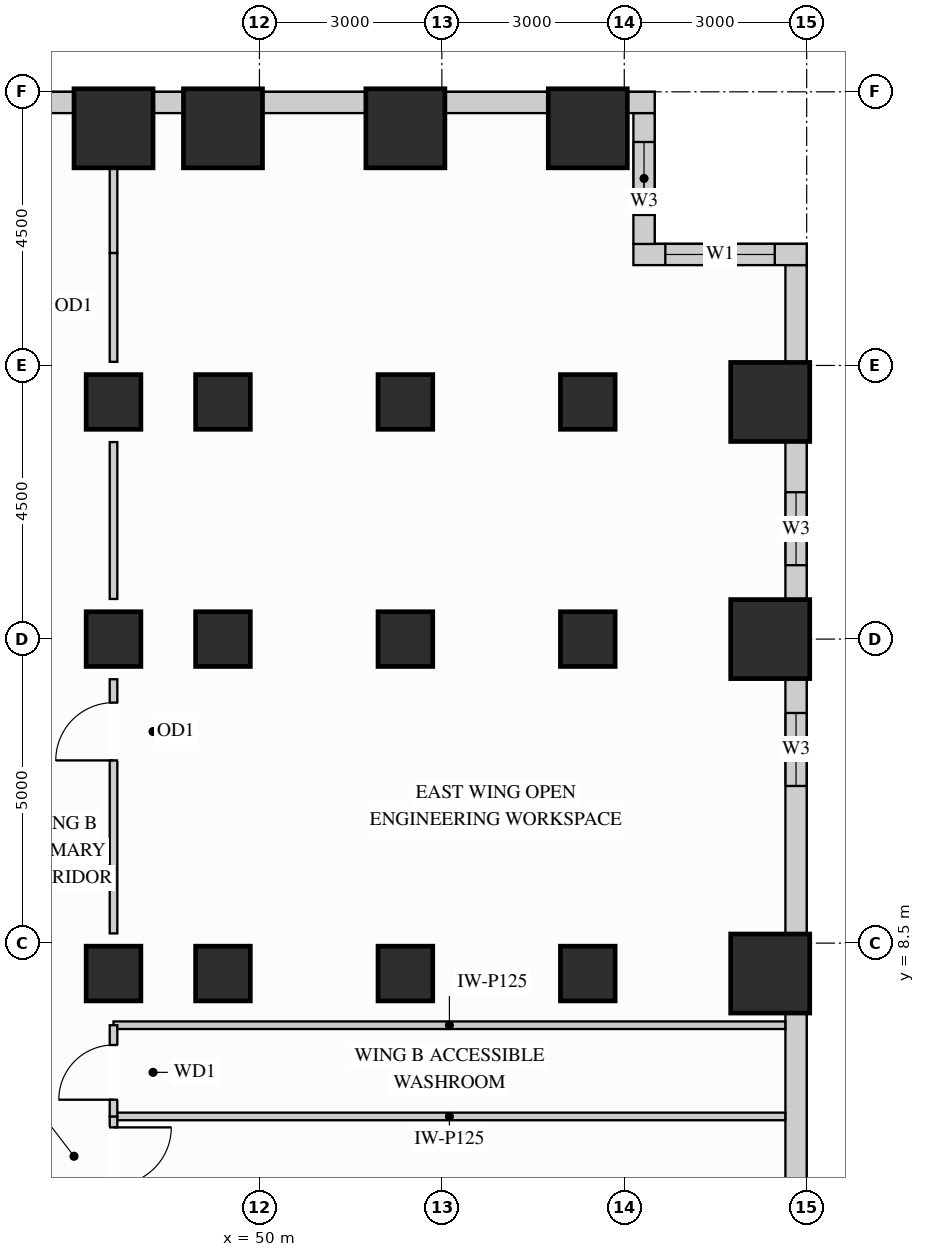
"""IFC4 building model, lengths in metres.
Left out: names, types, materials, properties, quantities, classifications, styles, units other than length and angle.
Written with IfcOpenShell. Run it as: python <this file> out.ifc"""

import sys

from ifc_helpers import new_model, si_unit, direction, frame, frame_2d, origin, origin_2d, place, context, subcontext, project, spatial, rectangle, extrude, source, transform, mapped, element, fill, save


model = new_model("IFC4")
c1 = context("Model", 3, precision=1e-05, world=origin(), true_north=direction((0.0, 1.0)))
c2 = subcontext(c1, "Body", "Model", "MODEL_VIEW")
j1 = project(units=[si_unit("LENGTHUNIT", "METRE"), si_unit("PLANEANGLEUNIT", "RADIAN")], contexts=[c1])
p1 = place(None, origin())
s1 = spatial("IfcSite", under=j1, at=p1, CompositionType="ELEMENT")
p2 = place(p1, origin())
s2 = spatial("IfcBuilding", under=s1, at=p2, CompositionType="ELEMENT")
p3 = place(p2, frame((0.0, 0.0, 36.9)))
s3 = spatial("IfcBuildingStorey", under=s2, at=p3, CompositionType="ELEMENT", Elevation=36.9)
m1 = source(origin(), c2, "Body", "SweptSolid", [
    extrude(rectangle(XDim=0.9, YDim=0.9, at=origin_2d()), origin(), (0.0, 0.0, 1.0), 3.38),
])
for number, where, z_axis, x_axis in (
    (1, (47.6, 13.5, 0.0), (0.0, 0.0, 1.0), (1.0, 0.0, 0.0)),
    (2, (47.6, 8.0, 0.0), (0.0, 0.0, 1.0), (1.0, 0.0, 0.0)),
    (3, (47.6, 17.4, 0.0), (0.0, 0.0, 1.0), (1.0, 0.0, 0.0)),
    (4, (49.4, 13.5, 0.0), (0.0, 0.0, 1.0), (1.0, 0.0, 0.0)),
    (5, (49.4, 17.4, 0.0), (0.0, 0.0, 1.0), (1.0, 0.0, 0.0)),
    (6, (49.4, 8.0, 0.0), (0.0, 0.0, 1.0), (1.0, 0.0, 0.0)),
    (7, (52.4, 13.5, 0.0), (0.0, 0.0, 1.0), (1.0, 0.0, 0.0)),
    (8, (52.4, 17.4, 0.0), (0.0, 0.0, 1.0), (1.0, 0.0, 0.0)),
    (9, (52.4, 8.0, 0.0), (0.0, 0.0, 1.0), (1.0, 0.0, 0.0)),
    (10, (55.4, 13.5, 0.0), (0.0, 0.0, 1.0), (1.0, 0.0, 0.0)),
    (11, (55.4, 17.4, 0.0), (0.0, 0.0, 1.0), (1.0, 0.0, 0.0)),
    (12, (55.4, 8.0, 0.0), (0.0, 0.0, 1.0), (1.0, 0.0, 0.0)),
):
    element("IfcColumn", number, at=place(p3, frame(where, z_axis=z_axis, x_axis=x_axis)), inside=s3, PredefinedType="COLUMN", context=c2, shape_type="MappedRepresentation", body=[
        mapped(m1, transform((0.0, 0.0, 0.0), x_axis=(1.0, 0.0, 0.0), y_axis=(0.0, 1.0, 0.0), z_axis=(0.0, 0.0, 1.0))),
    ])
m2 = source(origin(), c2, "Body", "SweptSolid", [
    extrude(rectangle(XDim=1.3, YDim=1.3, at=origin_2d()), origin(), (0.0, 0.0, 1.0), 3.38),
])
for number, where, z_axis, x_axis in (
    (13, (47.6, 21.9, 0.0), (0.0, 0.0, 1.0), (1.0, 0.0, 0.0)),
    (14, (49.4, 21.9, 0.0), (0.0, 0.0, 1.0), (1.0, 0.0, 0.0)),
    (15, (52.4, 21.9, 0.0), (0.0, 0.0, 1.0), (1.0, 0.0, 0.0)),
    (16, (55.4, 21.9, 0.0), (0.0, 0.0, 1.0), (1.0, 0.0, 0.0)),
    (17, (58.4, 13.5, 0.0), (0.0, 0.0, 1.0), (1.0, 0.0, 0.0)),
    (18, (58.4, 17.4, 0.0), (0.0, 0.0, 1.0), (1.0, 0.0, 0.0)),
    (19, (58.4, 8.0, 0.0), (0.0, 0.0, 1.0), (1.0, 0.0, 0.0)),
):
    element("IfcColumn", number, at=place(p3, frame(where, z_axis=z_axis, x_axis=x_axis)), inside=s3, PredefinedType="COLUMN", context=c2, shape_type="MappedRepresentation", body=[
        mapped(m2, transform((0.0, 0.0, 0.0), x_axis=(1.0, 0.0, 0.0), y_axis=(0.0, 1.0, 0.0), z_axis=(0.0, 0.0, 1.0))),
    ])
m3 = source(origin(), c2, "Body", "SweptSolid", [
    extrude(rectangle(XDim=3.204, YDim=0.35, at=frame_2d((1.602, 0.0))), origin(), (0.0, 0.0, 1.0), 2.51),
])
p4 = place(p3, frame((58.825, 4.148, 0.0), z_axis=(0.0, 0.0, 1.0), x_axis=(0.0, 1.0, 0.0)))
e20 = element("IfcWall", 20, at=p4, inside=s3, PredefinedType="SOLIDWALL", context=c2, shape_type="MappedRepresentation", body=[
    mapped(m3, transform((0.0, 0.0, 0.0), x_axis=(1.0, 0.0, 0.0), y_axis=(0.0, 1.0, 0.0), z_axis=(0.0, 0.0, 1.0))),
])
p5 = place(p3, frame((58.825, 8.648, 0.0), z_axis=(0.0, 0.0, 1.0), x_axis=(0.0, 1.0, 0.0)))
e21 = element("IfcWall", 21, at=p5, inside=s3, PredefinedType="SOLIDWALL", context=c2, shape_type="SweptSolid", body=[
    extrude(rectangle(XDim=4.204, YDim=0.35, at=frame_2d((2.102, 0.0))), origin(), (0.0, 0.0, 1.0), 2.51),
])
p6 = place(p5, frame((2.437, 0.0, 0.78)))
e22 = element("IfcOpeningElement", 22, at=p6, cuts=e21, PredefinedType="OPENING", context=c2, shape_type="SweptSolid", body=[
    extrude(rectangle(XDim=1.2, YDim=1.55, at=frame_2d((0.6, 0.775))), frame((0.0, 0.185, 0.0), z_axis=(0.0, -1.0, 0.0), x_axis=(1.0, 0.0, 0.0)), (0.0, 0.0, 1.0), 0.37),
])
p7 = place(p3, frame((58.825, 14.148, 0.0), z_axis=(0.0, 0.0, 1.0), x_axis=(0.0, 1.0, 0.0)))
e23 = element("IfcWall", 23, at=p7, inside=s3, PredefinedType="SOLIDWALL", context=c2, shape_type="SweptSolid", body=[
    extrude(rectangle(XDim=2.604, YDim=0.35, at=frame_2d((1.302, 0.0))), origin(), (0.0, 0.0, 1.0), 2.51),
])
p8 = place(p7, frame((0.567, 0.0, 0.78)))
e24 = element("IfcOpeningElement", 24, at=p8, cuts=e23, PredefinedType="OPENING", context=c2, shape_type="SweptSolid", body=[
    extrude(rectangle(XDim=1.2, YDim=1.55, at=frame_2d((0.6, 0.775))), frame((0.0, 0.185, 0.0), z_axis=(0.0, -1.0, 0.0), x_axis=(1.0, 0.0, 0.0)), (0.0, 0.0, 1.0), 0.37),
])
m4 = source(origin(), c2, "Body", "SweptSolid", [
    extrude(rectangle(XDim=1.604, YDim=0.35, at=frame_2d((0.802, 0.0))), origin(), (0.0, 0.0, 1.0), 3.365),
])
p9 = place(p3, frame((58.825, 18.048, 0.0), z_axis=(0.0, 0.0, 1.0), x_axis=(0.0, 1.0, 0.0)))
e25 = element("IfcWall", 25, at=p9, inside=s3, PredefinedType="SOLIDWALL", context=c2, shape_type="MappedRepresentation", body=[
    mapped(m4, transform((0.0, 0.0, 0.0), x_axis=(1.0, 0.0, 0.0), y_axis=(0.0, 1.0, 0.0), z_axis=(0.0, 0.0, 1.0))),
])
p10 = place(p3, frame((59.0, 19.825, 0.0), z_axis=(0.0, 0.0, 1.0), x_axis=(-1.0, 0.0, 0.0)))
e26 = element("IfcWall", 26, at=p10, inside=s3, PredefinedType="SOLIDWALL", context=c2, shape_type="SweptSolid", body=[
    extrude(rectangle(XDim=2.85, YDim=0.35, at=frame_2d((1.425, 0.0))), origin(), (0.0, 0.0, 1.0), 3.365),
])
p11 = place(p10, frame((0.525, 0.0, 0.78)))
e27 = element("IfcOpeningElement", 27, at=p11, cuts=e26, PredefinedType="OPENING", context=c2, shape_type="SweptSolid", body=[
    extrude(rectangle(XDim=1.8, YDim=2.1, at=frame_2d((0.9, 1.05))), frame((0.0, 0.185, 0.0), z_axis=(0.0, -1.0, 0.0), x_axis=(1.0, 0.0, 0.0)), (0.0, 0.0, 1.0), 0.37),
])
p12 = place(p3, frame((56.325, 19.998, 0.0), z_axis=(0.0, 0.0, 1.0), x_axis=(0.0, 1.0, 0.0)))
e28 = element("IfcWall", 28, at=p12, inside=s3, PredefinedType="SOLIDWALL", context=c2, shape_type="SweptSolid", body=[
    extrude(rectangle(XDim=2.154, YDim=0.35, at=frame_2d((1.077, 0.0))), origin(), (0.0, 0.0, 1.0), 3.365),
])
p13 = place(p12, frame((0.477, 0.0, 0.78)))
e29 = element("IfcOpeningElement", 29, at=p13, cuts=e28, PredefinedType="OPENING", context=c2, shape_type="SweptSolid", body=[
    extrude(rectangle(XDim=1.2, YDim=2.1, at=frame_2d((0.6, 1.05))), frame((0.0, 0.185, 0.0), z_axis=(0.0, -1.0, 0.0), x_axis=(1.0, 0.0, 0.0)), (0.0, 0.0, 1.0), 0.37),
])
m5 = source(origin(), c2, "Body", "SweptSolid", [
    extrude(rectangle(XDim=0.452, YDim=0.35, at=frame_2d((0.226, 0.0))), origin(), (0.0, 0.0, 1.0), 3.365),
])
p14 = place(p3, frame((56.5, 22.325, 0.0), z_axis=(0.0, 0.0, 1.0), x_axis=(-1.0, 0.0, 0.0)))
e30 = element("IfcWall", 30, at=p14, inside=s3, PredefinedType="SOLIDWALL", context=c2, shape_type="MappedRepresentation", body=[
    mapped(m5, transform((0.0, 0.0, 0.0), x_axis=(1.0, 0.0, 0.0), y_axis=(0.0, 1.0, 0.0), z_axis=(0.0, 0.0, 1.0))),
])
m6 = source(origin(), c2, "Body", "SweptSolid", [
    extrude(rectangle(XDim=1.704, YDim=0.35, at=frame_2d((0.852, 0.0))), origin(), (0.0, 0.0, 1.0), 2.51),
])
for number, where, z_axis, x_axis in (
    (31, (54.752, 22.325, 0.0), (0.0, 0.0, 1.0), (-1.0, 0.0, 0.0)),
    (32, (51.752, 22.325, 0.0), (0.0, 0.0, 1.0), (-1.0, 0.0, 0.0)),
):
    element("IfcWall", number, at=place(p3, frame(where, z_axis=z_axis, x_axis=x_axis)), inside=s3, PredefinedType="SOLIDWALL", context=c2, shape_type="MappedRepresentation", body=[
        mapped(m6, transform((0.0, 0.0, 0.0), x_axis=(1.0, 0.0, 0.0), y_axis=(0.0, 1.0, 0.0), z_axis=(0.0, 0.0, 1.0))),
    ])
m7 = source(origin(), c2, "Body", "SweptSolid", [
    extrude(rectangle(XDim=0.504, YDim=0.35, at=frame_2d((0.252, 0.0))), origin(), (0.0, 0.0, 1.0), 3.365),
])
p15 = place(p3, frame((48.752, 22.325, 0.0), z_axis=(0.0, 0.0, 1.0), x_axis=(-1.0, 0.0, 0.0)))
e33 = element("IfcWall", 33, at=p15, inside=s3, PredefinedType="SOLIDWALL", context=c2, shape_type="MappedRepresentation", body=[
    mapped(m7, transform((0.0, 0.0, 0.0), x_axis=(1.0, 0.0, 0.0), y_axis=(0.0, 1.0, 0.0), z_axis=(0.0, 0.0, 1.0))),
])
p16 = place(p3, frame((46.952, 22.325, 0.0), z_axis=(0.0, 0.0, 1.0), x_axis=(-1.0, 0.0, 0.0)))
e34 = element("IfcWall", 34, at=p16, inside=s3, PredefinedType="SOLIDWALL", context=c2, shape_type="SweptSolid", body=[
    extrude(rectangle(XDim=6.304, YDim=0.35, at=frame_2d((3.152, 0.0))), origin(), (0.0, 0.0, 1.0), 2.51),
])
p17 = place(p16, frame((1.649, 0.0, 0.78)))
e35 = element("IfcOpeningElement", 35, at=p17, cuts=e34, PredefinedType="OPENING", context=c2, shape_type="SweptSolid", body=[
    extrude(rectangle(XDim=1.8, YDim=1.55, at=frame_2d((0.9, 0.775))), frame((0.0, 0.185, 0.0), z_axis=(0.0, -1.0, 0.0), x_axis=(1.0, 0.0, 0.0)), (0.0, 0.0, 1.0), 0.37),
])
p18 = place(p16, frame((3.817, 0.0, 0.78)))
e36 = element("IfcOpeningElement", 36, at=p18, cuts=e34, PredefinedType="OPENING", context=c2, shape_type="SweptSolid", body=[
    extrude(rectangle(XDim=1.8, YDim=1.55, at=frame_2d((0.9, 0.775))), frame((0.0, 0.185, 0.0), z_axis=(0.0, -1.0, 0.0), x_axis=(1.0, 0.0, 0.0)), (0.0, 0.0, 1.0), 0.37),
])
m8 = source(origin(), c2, "Body", "SweptSolid", [
    extrude(rectangle(XDim=11.048, YDim=0.125, at=frame_2d((5.524, 0.0))), origin(), (0.0, 0.0, 1.0), 3.365),
])
for number, where, z_axis, x_axis in (
    (37, (47.6, 5.65, 0.0), (0.0, 0.0, 1.0), (1.0, 0.0, 0.0)),
    (38, (47.6, 7.15, 0.0), (0.0, 0.0, 1.0), (1.0, 0.0, 0.0)),
):
    element("IfcWall", number, at=place(p3, frame(where, z_axis=z_axis, x_axis=x_axis)), inside=s3, PredefinedType="PARTITIONING", context=c2, shape_type="MappedRepresentation", body=[
        mapped(m8, transform((0.0, 0.0, 0.0), x_axis=(1.0, 0.0, 0.0), y_axis=(0.0, 1.0, 0.0), z_axis=(0.0, 0.0, 1.0))),
    ])
p19 = place(p3, frame((47.6, 4.16, 0.0), z_axis=(0.0, 0.0, 1.0), x_axis=(0.0, 1.0, 0.0)))
e39 = element("IfcWall", 39, at=p19, inside=s3, PredefinedType="PARTITIONING", context=c2, shape_type="SweptSolid", body=[
    extrude(rectangle(XDim=1.49, YDim=0.125, at=frame_2d((0.745, 0.0))), origin(), (0.0, 0.0, 1.0), 2.67),
])
p20 = place(p19, frame((0.36, 0.0, 0.0)))
e40 = element("IfcOpeningElement", 40, at=p20, cuts=e39, PredefinedType="OPENING", context=c2, shape_type="SweptSolid", body=[
    extrude(rectangle(XDim=0.95, YDim=2.15, at=frame_2d((0.475, 1.075))), frame((0.0, 0.073, 0.0), z_axis=(0.0, -1.0, 0.0), x_axis=(1.0, 0.0, 0.0)), (0.0, 0.0, 1.0), 0.145),
])
p21 = place(p3, frame((47.6, 8.66, 0.0), z_axis=(0.0, 0.0, 1.0), x_axis=(0.0, 1.0, 0.0)))
e41 = element("IfcWall", 41, at=p21, inside=s3, PredefinedType="PARTITIONING", context=c2, shape_type="SweptSolid", body=[
    extrude(rectangle(XDim=4.18, YDim=0.125, at=frame_2d((2.09, 0.0))), origin(), (0.0, 0.0, 1.0), 2.67),
])
p22 = place(p21, frame((2.845, 0.0, 0.0)))
e42 = element("IfcOpeningElement", 42, at=p22, cuts=e41, PredefinedType="OPENING", context=c2, shape_type="SweptSolid", body=[
    extrude(rectangle(XDim=0.95, YDim=2.15, at=frame_2d((0.475, 1.075))), frame((0.0, 0.073, 0.0), z_axis=(0.0, -1.0, 0.0), x_axis=(1.0, 0.0, 0.0)), (0.0, 0.0, 1.0), 0.145),
])
m9 = source(origin(), c2, "Body", "SweptSolid", [
    extrude(rectangle(XDim=2.58, YDim=0.125, at=frame_2d((1.29, 0.0))), origin(), (0.0, 0.0, 1.0), 2.67),
])
p23 = place(p3, frame((47.6, 14.16, 0.0), z_axis=(0.0, 0.0, 1.0), x_axis=(0.0, 1.0, 0.0)))
e43 = element("IfcWall", 43, at=p23, inside=s3, PredefinedType="PARTITIONING", context=c2, shape_type="MappedRepresentation", body=[
    mapped(m9, transform((0.0, 0.0, 0.0), x_axis=(1.0, 0.0, 0.0), y_axis=(0.0, 1.0, 0.0), z_axis=(0.0, 0.0, 1.0))),
])
m10 = source(origin(), c2, "Body", "SweptSolid", [
    extrude(rectangle(XDim=1.79, YDim=0.125, at=frame_2d((0.895, 0.0))), origin(), (0.0, 0.0, 1.0), 2.67),
])
p24 = place(p3, frame((47.6, 18.06, 0.0), z_axis=(0.0, 0.0, 1.0), x_axis=(0.0, 1.0, 0.0)))
e44 = element("IfcWall", 44, at=p24, inside=s3, PredefinedType="PARTITIONING", context=c2, shape_type="MappedRepresentation", body=[
    mapped(m10, transform((0.0, 0.0, 0.0), x_axis=(1.0, 0.0, 0.0), y_axis=(0.0, 1.0, 0.0), z_axis=(0.0, 0.0, 1.0))),
])
m11 = source(origin(), c2, "Body", "SweptSolid", [
    extrude(rectangle(XDim=1.39, YDim=0.125, at=frame_2d((0.695, 0.0))), origin(), (0.0, 0.0, 1.0), 2.67),
])
p25 = place(p3, frame((47.6, 19.85, 0.0), z_axis=(0.0, 0.0, 1.0), x_axis=(0.0, 1.0, 0.0)))
e45 = element("IfcWall", 45, at=p25, inside=s3, PredefinedType="PARTITIONING", context=c2, shape_type="MappedRepresentation", body=[
    mapped(m11, transform((0.0, 0.0, 0.0), x_axis=(1.0, 0.0, 0.0), y_axis=(0.0, 1.0, 0.0), z_axis=(0.0, 0.0, 1.0))),
])
p26 = place(p3, frame((47.6, 5.65, 0.0), z_axis=(0.0, 0.0, 1.0), x_axis=(0.0, 1.0, 0.0)))
e46 = element("IfcWall", 46, at=p26, inside=s3, PredefinedType="PARTITIONING", context=c2, shape_type="SweptSolid", body=[
    extrude(rectangle(XDim=1.5, YDim=0.125, at=frame_2d((0.75, 0.0))), origin(), (0.0, 0.0, 1.0), 2.67),
])
p27 = place(p26, frame((0.275, 0.0, 0.0)))
e47 = element("IfcOpeningElement", 47, at=p27, cuts=e46, PredefinedType="OPENING", context=c2, shape_type="SweptSolid", body=[
    extrude(rectangle(XDim=0.9, YDim=2.15, at=frame_2d((0.45, 1.075))), frame((0.0, 0.073, 0.0), z_axis=(0.0, -1.0, 0.0), x_axis=(1.0, 0.0, 0.0)), (0.0, 0.0, 1.0), 0.145),
])
m12 = source(origin(), c2, "Body", "SweptSolid", [
    extrude(rectangle(XDim=0.95, YDim=2.15, at=frame_2d((0.475, 1.075))), frame((0.0, 0.025, 0.0), z_axis=(0.0, -1.0, 0.0), x_axis=(1.0, 0.0, 0.0)), (0.0, 0.0, 1.0), 0.05),
])
p28 = place(p20, origin())
e48 = element("IfcDoor", 48, at=p28, inside=s3, OperationType="SINGLE_SWING_RIGHT", PredefinedType="DOOR", context=c2, shape_type="MappedRepresentation", body=[
    mapped(m12, transform((0.0, 0.0, 0.0), x_axis=(1.0, 0.0, 0.0), y_axis=(0.0, 1.0, 0.0), z_axis=(0.0, 0.0, 1.0))),
])
fill(e40, e48)
p29 = place(p22, origin())
e49 = element("IfcDoor", 49, at=p29, inside=s3, OperationType="SINGLE_SWING_LEFT", PredefinedType="DOOR", context=c2, shape_type="MappedRepresentation", body=[
    mapped(m12, transform((0.0, 0.0, 0.0), x_axis=(1.0, 0.0, 0.0), y_axis=(0.0, 1.0, 0.0), z_axis=(0.0, 0.0, 1.0))),
])
fill(e42, e49)
m13 = source(origin(), c2, "Body", "SweptSolid", [
    extrude(rectangle(XDim=0.9, YDim=2.15, at=frame_2d((0.45, 1.075))), frame((0.0, 0.025, 0.0), z_axis=(0.0, -1.0, 0.0), x_axis=(1.0, 0.0, 0.0)), (0.0, 0.0, 1.0), 0.05),
])
p30 = place(p27, origin())
e50 = element("IfcDoor", 50, at=p30, inside=s3, OperationType="SINGLE_SWING_LEFT", PredefinedType="DOOR", context=c2, shape_type="MappedRepresentation", body=[
    mapped(m13, transform((0.0, 0.0, 0.0), x_axis=(1.0, 0.0, 0.0), y_axis=(0.0, 1.0, 0.0), z_axis=(0.0, 0.0, 1.0))),
])
fill(e47, e50)
m14 = source(origin(), c2, "Body", "SweptSolid", [
    extrude(rectangle(XDim=1.8, YDim=2.1, at=frame_2d((0.9, 1.05))), frame((0.0, 0.03, 0.0), z_axis=(0.0, -1.0, 0.0), x_axis=(1.0, 0.0, 0.0)), (0.0, 0.0, 1.0), 0.06),
])
p31 = place(p11, origin())
e51 = element("IfcWindow", 51, at=p31, inside=s3, PartitioningType="SINGLE_PANEL", PredefinedType="WINDOW", context=c2, shape_type="MappedRepresentation", body=[
    mapped(m14, transform((0.0, 0.0, 0.0), x_axis=(1.0, 0.0, 0.0), y_axis=(0.0, 1.0, 0.0), z_axis=(0.0, 0.0, 1.0))),
])
fill(e27, e51)
m15 = source(origin(), c2, "Body", "SweptSolid", [
    extrude(rectangle(XDim=1.2, YDim=1.55, at=frame_2d((0.6, 0.775))), frame((0.0, 0.03, 0.0), z_axis=(0.0, -1.0, 0.0), x_axis=(1.0, 0.0, 0.0)), (0.0, 0.0, 1.0), 0.06),
])
p32 = place(p6, origin())
e52 = element("IfcWindow", 52, at=p32, inside=s3, PartitioningType="SINGLE_PANEL", PredefinedType="WINDOW", context=c2, shape_type="MappedRepresentation", body=[
    mapped(m15, transform((0.0, 0.0, 0.0), x_axis=(1.0, 0.0, 0.0), y_axis=(0.0, 1.0, 0.0), z_axis=(0.0, 0.0, 1.0))),
])
fill(e22, e52)
p33 = place(p8, origin())
e53 = element("IfcWindow", 53, at=p33, inside=s3, PartitioningType="SINGLE_PANEL", PredefinedType="WINDOW", context=c2, shape_type="MappedRepresentation", body=[
    mapped(m15, transform((0.0, 0.0, 0.0), x_axis=(1.0, 0.0, 0.0), y_axis=(0.0, 1.0, 0.0), z_axis=(0.0, 0.0, 1.0))),
])
fill(e24, e53)
m16 = source(origin(), c2, "Body", "SweptSolid", [
    extrude(rectangle(XDim=1.2, YDim=2.1, at=frame_2d((0.6, 1.05))), frame((0.0, 0.03, 0.0), z_axis=(0.0, -1.0, 0.0), x_axis=(1.0, 0.0, 0.0)), (0.0, 0.0, 1.0), 0.06),
])
p34 = place(p13, origin())
e54 = element("IfcWindow", 54, at=p34, inside=s3, PartitioningType="SINGLE_PANEL", PredefinedType="WINDOW", context=c2, shape_type="MappedRepresentation", body=[
    mapped(m16, transform((0.0, 0.0, 0.0), x_axis=(1.0, 0.0, 0.0), y_axis=(0.0, 1.0, 0.0), z_axis=(0.0, 0.0, 1.0))),
])
fill(e29, e54)
save(model, sys.argv[1])
